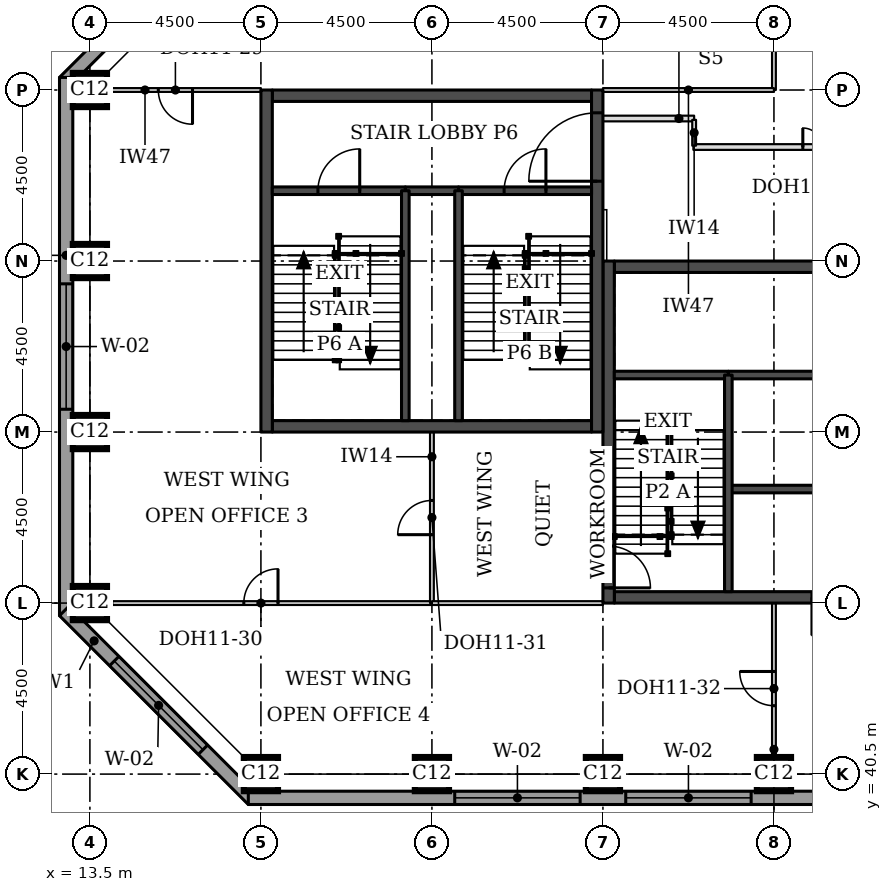
"""IFC4 building model, lengths in metres.
Left out: names, types, materials, properties, quantities, classifications, styles, units other than length and angle.
Written with IfcOpenShell. Run it as: python <this file> out.ifc"""

import sys

from ifc_helpers import new_model, si_unit, direction, frame, frame_2d, origin, origin_2d, place, context, subcontext, project, spatial, rectangle, extrude, element, fill, save


model = new_model("IFC4")
c1 = context("Model", 3, precision=1e-05, world=origin(), true_north=direction((0.0, 1.0)))
c2 = subcontext(c1, "Body", "Model", "MODEL_VIEW")
j1 = project(units=[si_unit("LENGTHUNIT", "METRE"), si_unit("PLANEANGLEUNIT", "RADIAN")], contexts=[c1])
p1 = place(None, origin())
s1 = spatial("IfcSite", under=j1, at=p1, CompositionType="ELEMENT")
p2 = place(p1, origin())
s2 = spatial("IfcBuilding", under=s1, at=p2, CompositionType="ELEMENT")
p3 = place(p2, frame((0.0, 0.0, 237.8)))
s3 = spatial("IfcBuildingStorey", under=s2, at=p3, CompositionType="ELEMENT", Elevation=237.8)
for number, where, z_axis, x_axis in (
    (1, (18.0, 40.5, 0.0), (0.0, 0.0, 1.0), (1.0, 0.0, 0.0)),
    (2, (22.5, 40.5, 0.0), (0.0, 0.0, 1.0), (1.0, 0.0, 0.0)),
    (3, (27.0, 40.5, 0.0), (0.0, 0.0, 1.0), (1.0, 0.0, 0.0)),
    (4, (31.5, 40.5, 0.0), (0.0, 0.0, 1.0), (1.0, 0.0, 0.0)),
    (5, (13.5, 45.0, 0.0), (0.0, 0.0, 1.0), (1.0, 0.0, 0.0)),
    (6, (13.5, 49.5, 0.0), (0.0, 0.0, 1.0), (1.0, 0.0, 0.0)),
    (7, (13.5, 54.0, 0.0), (0.0, 0.0, 1.0), (1.0, 0.0, 0.0)),
    (8, (13.5, 58.5, 0.0), (0.0, 0.0, 1.0), (1.0, 0.0, 0.0)),
):
    element("IfcColumn", number, at=place(p3, frame(where, z_axis=z_axis, x_axis=x_axis)), inside=s3, PredefinedType="COLUMN", context=c2, shape_type="SweptSolid", body=[
        extrude(rectangle(XDim=0.9, YDim=0.9, at=origin_2d()), origin(), (0.0, 0.0, 1.0), 3.7),
    ])
p4 = place(p3, frame((27.3, 45.15, 0.0), z_axis=(0.0, 0.0, 1.0), x_axis=(1.0, 0.0, 0.0)))
e9 = element("IfcWall", 9, at=p4, inside=s3, PredefinedType="SHEAR", context=c2, shape_type="SweptSolid", body=[
    extrude(rectangle(XDim=8.4, YDim=0.3, at=frame_2d((4.2, 0.0))), origin(), (0.0, 0.0, 1.0), 3.7),
])
p5 = place(p4, frame((5.2, 0.0, 0.0)))
e10 = element("IfcOpeningElement", 10, at=p5, cuts=e9, PredefinedType="OPENING", context=c2, shape_type="SweptSolid", body=[
    extrude(rectangle(XDim=1.0, YDim=2.1, at=frame_2d((0.5, 1.05))), frame((0.0, 0.16, 0.0), z_axis=(0.0, -1.0, 0.0), x_axis=(1.0, 0.0, 0.0)), (0.0, 0.0, 1.0), 0.32),
])
p6 = place(p3, frame((27.3, 53.85, 0.0), z_axis=(0.0, 0.0, 1.0), x_axis=(1.0, 0.0, 0.0)))
e11 = element("IfcWall", 11, at=p6, inside=s3, PredefinedType="SHEAR", context=c2, shape_type="SweptSolid", body=[
    extrude(rectangle(XDim=8.4, YDim=0.3, at=frame_2d((4.2, 0.0))), origin(), (0.0, 0.0, 1.0), 3.7),
])
p7 = place(p6, frame((6.4, 0.0, 0.0)))
e12 = element("IfcOpeningElement", 12, at=p7, cuts=e11, PredefinedType="OPENING", context=c2, shape_type="SweptSolid", body=[
    extrude(rectangle(XDim=1.1, YDim=2.1, at=frame_2d((0.55, 1.05))), frame((0.0, 0.16, 0.0), z_axis=(0.0, -1.0, 0.0), x_axis=(1.0, 0.0, 0.0)), (0.0, 0.0, 1.0), 0.32),
])
p8 = place(p3, frame((27.15, 45.0, 0.0), z_axis=(0.0, 0.0, 1.0), x_axis=(0.0, 1.0, 0.0)))
e13 = element("IfcWall", 13, at=p8, inside=s3, PredefinedType="SHEAR", context=c2, shape_type="SweptSolid", body=[
    extrude(rectangle(XDim=9.0, YDim=0.3, at=frame_2d((4.5, 0.0))), origin(), (0.0, 0.0, 1.0), 3.7),
])
p9 = place(p8, frame((0.4, 0.0, 0.0)))
e14 = element("IfcOpeningElement", 14, at=p9, cuts=e13, PredefinedType="OPENING", context=c2, shape_type="SweptSolid", body=[
    extrude(rectangle(XDim=1.1, YDim=2.1, at=frame_2d((0.55, 1.05))), frame((0.0, 0.16, 0.0), z_axis=(0.0, -1.0, 0.0), x_axis=(1.0, 0.0, 0.0)), (0.0, 0.0, 1.0), 0.32),
])
for number, where, z_axis, x_axis in (
    (15, (18.3, 49.65, 0.0), (0.0, 0.0, 1.0), (1.0, 0.0, 0.0)),
    (16, (18.3, 58.35, 0.0), (0.0, 0.0, 1.0), (1.0, 0.0, 0.0)),
):
    element("IfcWall", number, at=place(p3, frame(where, z_axis=z_axis, x_axis=x_axis)), inside=s3, PredefinedType="SHEAR", context=c2, shape_type="SweptSolid", body=[
        extrude(rectangle(XDim=8.4, YDim=0.3, at=frame_2d((4.2, 0.0))), origin(), (0.0, 0.0, 1.0), 3.7),
    ])
p10 = place(p3, frame((18.15, 49.5, 0.0), z_axis=(0.0, 0.0, 1.0), x_axis=(0.0, 1.0, 0.0)))
e17 = element("IfcWall", 17, at=p10, inside=s3, PredefinedType="SHEAR", context=c2, shape_type="SweptSolid", body=[
    extrude(rectangle(XDim=9.0, YDim=0.3, at=frame_2d((4.5, 0.0))), origin(), (0.0, 0.0, 1.0), 3.7),
])
p11 = place(p3, frame((26.85, 49.5, 0.0), z_axis=(0.0, 0.0, 1.0), x_axis=(0.0, 1.0, 0.0)))
e18 = element("IfcWall", 18, at=p11, inside=s3, PredefinedType="SHEAR", context=c2, shape_type="SweptSolid", body=[
    extrude(rectangle(XDim=9.0, YDim=0.3, at=frame_2d((4.5, 0.0))), origin(), (0.0, 0.0, 1.0), 3.7),
])
p12 = place(p11, frame((6.6, 0.0, 0.0)))
e19 = element("IfcOpeningElement", 19, at=p12, cuts=e18, PredefinedType="OPENING", context=c2, shape_type="SweptSolid", body=[
    extrude(rectangle(XDim=1.8, YDim=2.1, at=frame_2d((0.9, 1.05))), frame((0.0, 0.16, 0.0), z_axis=(0.0, -1.0, 0.0), x_axis=(1.0, 0.0, 0.0)), (0.0, 0.0, 1.0), 0.32),
])
p13 = place(p3, frame((17.792, 63.676, 0.0), z_axis=(0.0, 0.0, 1.0), x_axis=(-0.707106781187, -0.707106781187, 0.0)))
e20 = element("IfcWall", 20, at=p13, inside=s3, PredefinedType="STANDARD", context=c2, shape_type="SweptSolid", body=[
    extrude(rectangle(XDim=7.027, YDim=0.35, at=frame_2d((3.513, 0.0))), origin(), (0.0, 0.0, 1.0), 3.525),
])
p14 = place(p13, frame((1.863, 0.0, 0.9)))
e21 = element("IfcOpeningElement", 21, at=p14, cuts=e20, PredefinedType="OPENING", context=c2, shape_type="SweptSolid", body=[
    extrude(rectangle(XDim=3.3, YDim=1.9, at=frame_2d((1.65, 0.95))), frame((0.0, 0.185, 0.0), z_axis=(0.0, -1.0, 0.0), x_axis=(1.0, 0.0, 0.0)), (0.0, 0.0, 1.0), 0.37),
])
p15 = place(p3, frame((12.875, 58.831, 0.0), z_axis=(0.0, 0.0, 1.0), x_axis=(0.0, -1.0, 0.0)))
e22 = element("IfcWall", 22, at=p15, inside=s3, PredefinedType="STANDARD", context=c2, shape_type="SweptSolid", body=[
    extrude(rectangle(XDim=14.163, YDim=0.35, at=frame_2d((7.081, 0.0))), origin(), (0.0, 0.0, 1.0), 3.525),
])
p16 = place(p15, frame((5.431, 0.0, 0.9)))
e23 = element("IfcOpeningElement", 23, at=p16, cuts=e22, PredefinedType="OPENING", context=c2, shape_type="SweptSolid", body=[
    extrude(rectangle(XDim=3.3, YDim=1.9, at=frame_2d((1.65, 0.95))), frame((0.0, 0.185, 0.0), z_axis=(0.0, -1.0, 0.0), x_axis=(1.0, 0.0, 0.0)), (0.0, 0.0, 1.0), 0.37),
])
p17 = place(p3, frame((12.824, 44.792, 0.0), z_axis=(0.0, 0.0, 1.0), x_axis=(0.707106781187, -0.707106781187, 0.0)))
e24 = element("IfcWall", 24, at=p17, inside=s3, PredefinedType="STANDARD", context=c2, shape_type="SweptSolid", body=[
    extrude(rectangle(XDim=7.027, YDim=0.35, at=frame_2d((3.513, 0.0))), origin(), (0.0, 0.0, 1.0), 3.525),
])
p18 = place(p17, frame((1.863, 0.0, 0.9)))
e25 = element("IfcOpeningElement", 25, at=p18, cuts=e24, PredefinedType="OPENING", context=c2, shape_type="SweptSolid", body=[
    extrude(rectangle(XDim=3.3, YDim=1.9, at=frame_2d((1.65, 0.95))), frame((0.0, 0.185, 0.0), z_axis=(0.0, -1.0, 0.0), x_axis=(1.0, 0.0, 0.0)), (0.0, 0.0, 1.0), 0.37),
])
p19 = place(p3, frame((17.669, 39.875, 0.0), z_axis=(0.0, 0.0, 1.0), x_axis=(1.0, 0.0, 0.0)))
e26 = element("IfcWall", 26, at=p19, inside=s3, PredefinedType="STANDARD", context=c2, shape_type="SweptSolid", body=[
    extrude(rectangle(XDim=18.331, YDim=0.35, at=frame_2d((9.166, 0.0))), origin(), (0.0, 0.0, 1.0), 3.525),
])
p20 = place(p19, frame((5.431, 0.0, 0.9)))
e27 = element("IfcOpeningElement", 27, at=p20, cuts=e26, PredefinedType="OPENING", context=c2, shape_type="SweptSolid", body=[
    extrude(rectangle(XDim=3.3, YDim=1.9, at=frame_2d((1.65, 0.95))), frame((0.0, 0.185, 0.0), z_axis=(0.0, -1.0, 0.0), x_axis=(1.0, 0.0, 0.0)), (0.0, 0.0, 1.0), 0.37),
])
p21 = place(p19, frame((9.931, 0.0, 0.9)))
e28 = element("IfcOpeningElement", 28, at=p21, cuts=e26, PredefinedType="OPENING", context=c2, shape_type="SweptSolid", body=[
    extrude(rectangle(XDim=3.3, YDim=1.9, at=frame_2d((1.65, 0.95))), frame((0.0, 0.185, 0.0), z_axis=(0.0, -1.0, 0.0), x_axis=(1.0, 0.0, 0.0)), (0.0, 0.0, 1.0), 0.37),
])
p22 = place(p3, frame((29.38, 57.0, 0.0), z_axis=(0.0, 0.0, 1.0), x_axis=(1.0, 0.0, 0.0)))
e29 = element("IfcWall", 29, at=p22, inside=s3, PredefinedType="PARTITIONING", context=c2, shape_type="SweptSolid", body=[
    extrude(rectangle(XDim=6.62, YDim=0.15, at=frame_2d((3.31, 0.0))), origin(), (0.0, 0.0, 1.0), 3.55),
])
p23 = place(p22, frame((2.88, 0.0, 0.0)))
e30 = element("IfcOpeningElement", 30, at=p23, cuts=e29, PredefinedType="OPENING", context=c2, shape_type="SweptSolid", body=[
    extrude(rectangle(XDim=1.0, YDim=2.1, at=frame_2d((0.5, 1.05))), frame((0.0, 0.085, 0.0), z_axis=(0.0, -1.0, 0.0), x_axis=(1.0, 0.0, 0.0)), (0.0, 0.0, 1.0), 0.17),
])
p24 = place(p3, frame((31.5, 63.0, 0.0), z_axis=(0.0, 0.0, 1.0), x_axis=(0.0, -1.0, 0.0)))
e31 = element("IfcWall", 31, at=p24, inside=s3, PredefinedType="PARTITIONING", context=c2, shape_type="SweptSolid", body=[
    extrude(rectangle(XDim=4.5, YDim=0.1, at=frame_2d((2.25, 0.0))), origin(), (0.0, 0.0, 1.0), 3.55),
])
p25 = place(p24, frame((1.8, 0.0, 0.0)))
e32 = element("IfcOpeningElement", 32, at=p25, cuts=e31, PredefinedType="OPENING", context=c2, shape_type="SweptSolid", body=[
    extrude(rectangle(XDim=0.9, YDim=2.1, at=frame_2d((0.45, 1.05))), frame((0.0, 0.06, 0.0), z_axis=(0.0, -1.0, 0.0), x_axis=(1.0, 0.0, 0.0)), (0.0, 0.0, 1.0), 0.12),
])
p26 = place(p3, frame((31.5, 58.5, 0.0), z_axis=(0.0, 0.0, 1.0), x_axis=(-1.0, 0.0, 0.0)))
e33 = element("IfcWall", 33, at=p26, inside=s3, PredefinedType="PARTITIONING", context=c2, shape_type="SweptSolid", body=[
    extrude(rectangle(XDim=4.5, YDim=0.1, at=frame_2d((2.25, 0.0))), origin(), (0.0, 0.0, 1.0), 2.55),
])
p27 = place(p3, frame((13.5, 58.5, 0.0), z_axis=(0.0, 0.0, 1.0), x_axis=(1.0, 0.0, 0.0)))
e34 = element("IfcWall", 34, at=p27, inside=s3, PredefinedType="PARTITIONING", context=c2, shape_type="SweptSolid", body=[
    extrude(rectangle(XDim=4.5, YDim=0.1, at=frame_2d((2.25, 0.0))), origin(), (0.0, 0.0, 1.0), 2.55),
])
p28 = place(p27, frame((1.8, 0.0, 0.0)))
e35 = element("IfcOpeningElement", 35, at=p28, cuts=e34, PredefinedType="OPENING", context=c2, shape_type="SweptSolid", body=[
    extrude(rectangle(XDim=0.9, YDim=2.1, at=frame_2d((0.45, 1.05))), frame((0.0, 0.06, 0.0), z_axis=(0.0, -1.0, 0.0), x_axis=(1.0, 0.0, 0.0)), (0.0, 0.0, 1.0), 0.12),
])
p29 = place(p3, frame((22.5, 45.0, 0.0), z_axis=(0.0, 0.0, 1.0), x_axis=(-1.0, 0.0, 0.0)))
e36 = element("IfcWall", 36, at=p29, inside=s3, PredefinedType="PARTITIONING", context=c2, shape_type="SweptSolid", body=[
    extrude(rectangle(XDim=9.0, YDim=0.1, at=frame_2d((4.5, 0.0))), origin(), (0.0, 0.0, 1.0), 2.55),
])
p30 = place(p29, frame((4.05, 0.0, 0.0)))
e37 = element("IfcOpeningElement", 37, at=p30, cuts=e36, PredefinedType="OPENING", context=c2, shape_type="SweptSolid", body=[
    extrude(rectangle(XDim=0.9, YDim=2.1, at=frame_2d((0.45, 1.05))), frame((0.0, 0.06, 0.0), z_axis=(0.0, -1.0, 0.0), x_axis=(1.0, 0.0, 0.0)), (0.0, 0.0, 1.0), 0.12),
])
p31 = place(p3, frame((22.5, 49.5, 0.0), z_axis=(0.0, 0.0, 1.0), x_axis=(0.0, -1.0, 0.0)))
e38 = element("IfcWall", 38, at=p31, inside=s3, PredefinedType="PARTITIONING", context=c2, shape_type="SweptSolid", body=[
    extrude(rectangle(XDim=4.5, YDim=0.1, at=frame_2d((2.25, 0.0))), origin(), (0.0, 0.0, 1.0), 3.55),
])
p32 = place(p31, frame((1.8, 0.0, 0.0)))
e39 = element("IfcOpeningElement", 39, at=p32, cuts=e38, PredefinedType="OPENING", context=c2, shape_type="SweptSolid", body=[
    extrude(rectangle(XDim=0.9, YDim=2.1, at=frame_2d((0.45, 1.05))), frame((0.0, 0.06, 0.0), z_axis=(0.0, -1.0, 0.0), x_axis=(1.0, 0.0, 0.0)), (0.0, 0.0, 1.0), 0.12),
])
p33 = place(p3, frame((22.5, 45.0, 0.0), z_axis=(0.0, 0.0, 1.0), x_axis=(1.0, 0.0, 0.0)))
e40 = element("IfcWall", 40, at=p33, inside=s3, PredefinedType="PARTITIONING", context=c2, shape_type="SweptSolid", body=[
    extrude(rectangle(XDim=4.5, YDim=0.1, at=frame_2d((2.25, 0.0))), origin(), (0.0, 0.0, 1.0), 2.55),
])
p34 = place(p3, frame((31.5, 45.0, 0.0), z_axis=(0.0, 0.0, 1.0), x_axis=(0.0, -1.0, 0.0)))
e41 = element("IfcWall", 41, at=p34, inside=s3, PredefinedType="PARTITIONING", context=c2, shape_type="SweptSolid", body=[
    extrude(rectangle(XDim=4.5, YDim=0.1, at=frame_2d((2.25, 0.0))), origin(), (0.0, 0.0, 1.0), 3.55),
])
p35 = place(p34, frame((1.8, 0.0, 0.0)))
e42 = element("IfcOpeningElement", 42, at=p35, cuts=e41, PredefinedType="OPENING", context=c2, shape_type="SweptSolid", body=[
    extrude(rectangle(XDim=0.9, YDim=2.1, at=frame_2d((0.45, 1.05))), frame((0.0, 0.06, 0.0), z_axis=(0.0, -1.0, 0.0), x_axis=(1.0, 0.0, 0.0)), (0.0, 0.0, 1.0), 0.12),
])
p36 = place(p3, frame((27.0, 57.75, 0.0), z_axis=(0.0, 0.0, 1.0), x_axis=(1.0, 0.0, 0.0)))
e43 = element("IfcWall", 43, at=p36, inside=s3, PredefinedType="PARTITIONING", context=c2, shape_type="SweptSolid", body=[
    extrude(rectangle(XDim=2.4, YDim=0.15, at=frame_2d((1.2, 0.0))), origin(), (0.0, 0.0, 1.0), 3.55),
])
p37 = place(p3, frame((29.4, 57.715, 0.0), z_axis=(0.0, 0.0, 1.0), x_axis=(0.0, -1.0, 0.0)))
e44 = element("IfcWall", 44, at=p37, inside=s3, PredefinedType="PARTITIONING", context=c2, shape_type="SweptSolid", body=[
    extrude(rectangle(XDim=0.68, YDim=0.1, at=frame_2d((0.34, 0.0))), origin(), (0.0, 0.0, 1.0), 3.55),
])
p38 = place(p3, frame((30.3, 48.0, 0.0), z_axis=(0.0, 0.0, 1.0), x_axis=(1.0, 0.0, 0.0)))
e45 = element("IfcWall", 45, at=p38, inside=s3, PredefinedType="SOLIDWALL", context=c2, shape_type="SweptSolid", body=[
    extrude(rectangle(XDim=2.4, YDim=0.2, at=frame_2d((1.2, 0.0))), origin(), (0.0, 0.0, 1.0), 3.55),
])
p39 = place(p3, frame((30.3, 51.0, 0.0), z_axis=(0.0, 0.0, 1.0), x_axis=(1.0, 0.0, 0.0)))
e46 = element("IfcWall", 46, at=p39, inside=s3, PredefinedType="SOLIDWALL", context=c2, shape_type="SweptSolid", body=[
    extrude(rectangle(XDim=2.4, YDim=0.2, at=frame_2d((1.2, 0.0))), origin(), (0.0, 0.0, 1.0), 3.7),
])
p40 = place(p3, frame((27.3, 51.0, 0.0), z_axis=(0.0, 0.0, 1.0), x_axis=(1.0, 0.0, 0.0)))
e47 = element("IfcWall", 47, at=p40, inside=s3, PredefinedType="SOLIDWALL", context=c2, shape_type="SweptSolid", body=[
    extrude(rectangle(XDim=3.0, YDim=0.2, at=frame_2d((1.5, 0.0))), origin(), (0.0, 0.0, 1.0), 3.55),
])
p41 = place(p3, frame((30.3, 45.3, 0.0), z_axis=(0.0, 0.0, 1.0), x_axis=(0.0, 1.0, 0.0)))
e48 = element("IfcWall", 48, at=p41, inside=s3, PredefinedType="SOLIDWALL", context=c2, shape_type="SweptSolid", body=[
    extrude(rectangle(XDim=5.7, YDim=0.2, at=frame_2d((2.85, 0.0))), origin(), (0.0, 0.0, 1.0), 3.55),
])
p42 = place(p3, frame((21.8, 55.85, 0.0), z_axis=(0.0, 0.0, 1.0), x_axis=(1.0, 0.0, 0.0)))
e49 = element("IfcWall", 49, at=p42, inside=s3, PredefinedType="SOLIDWALL", context=c2, shape_type="SweptSolid", body=[
    extrude(rectangle(XDim=1.4, YDim=0.2, at=frame_2d((0.7, 0.0))), origin(), (0.0, 0.0, 1.0), 3.55),
])
p43 = place(p3, frame((18.3, 55.85, 0.0), z_axis=(0.0, 0.0, 1.0), x_axis=(1.0, 0.0, 0.0)))
e50 = element("IfcWall", 50, at=p43, inside=s3, PredefinedType="SOLIDWALL", context=c2, shape_type="SweptSolid", body=[
    extrude(rectangle(XDim=3.5, YDim=0.2, at=frame_2d((1.75, 0.0))), origin(), (0.0, 0.0, 1.0), 3.55),
])
p44 = place(p43, frame((1.2, 0.0, 0.0)))
e51 = element("IfcOpeningElement", 51, at=p44, cuts=e50, PredefinedType="OPENING", context=c2, shape_type="SweptSolid", body=[
    extrude(rectangle(XDim=1.1, YDim=2.1, at=frame_2d((0.55, 1.05))), frame((0.0, 0.11, 0.0), z_axis=(0.0, -1.0, 0.0), x_axis=(1.0, 0.0, 0.0)), (0.0, 0.0, 1.0), 0.22),
])
p45 = place(p3, frame((23.2, 55.85, 0.0), z_axis=(0.0, 0.0, 1.0), x_axis=(1.0, 0.0, 0.0)))
e52 = element("IfcWall", 52, at=p45, inside=s3, PredefinedType="SOLIDWALL", context=c2, shape_type="SweptSolid", body=[
    extrude(rectangle(XDim=3.5, YDim=0.2, at=frame_2d((1.75, 0.0))), origin(), (0.0, 0.0, 1.0), 3.55),
])
p46 = place(p45, frame((1.2, 0.0, 0.0)))
e53 = element("IfcOpeningElement", 53, at=p46, cuts=e52, PredefinedType="OPENING", context=c2, shape_type="SweptSolid", body=[
    extrude(rectangle(XDim=1.1, YDim=2.1, at=frame_2d((0.55, 1.05))), frame((0.0, 0.11, 0.0), z_axis=(0.0, -1.0, 0.0), x_axis=(1.0, 0.0, 0.0)), (0.0, 0.0, 1.0), 0.22),
])
for number, where, z_axis, x_axis in (
    (54, (21.8, 49.8, 0.0), (0.0, 0.0, 1.0), (0.0, 1.0, 0.0)),
    (55, (23.2, 49.8, 0.0), (0.0, 0.0, 1.0), (0.0, 1.0, 0.0)),
):
    element("IfcWall", number, at=place(p3, frame(where, z_axis=z_axis, x_axis=x_axis)), inside=s3, PredefinedType="SOLIDWALL", context=c2, shape_type="SweptSolid", body=[
        extrude(rectangle(XDim=6.05, YDim=0.2, at=frame_2d((3.025, 0.0))), origin(), (0.0, 0.0, 1.0), 3.55),
    ])
p47 = place(p16, origin())
e56 = element("IfcWindow", 56, at=p47, inside=s3, PartitioningType="SINGLE_PANEL", PredefinedType="WINDOW", context=c2, shape_type="SweptSolid", body=[
    extrude(rectangle(XDim=3.3, YDim=1.9, at=frame_2d((1.65, 0.95))), frame((0.0, 0.085, 0.0), z_axis=(0.0, -1.0, 0.0), x_axis=(1.0, 0.0, 0.0)), (0.0, 0.0, 1.0), 0.06),
])
fill(e23, e56)
p48 = place(p18, origin())
e57 = element("IfcWindow", 57, at=p48, inside=s3, PartitioningType="SINGLE_PANEL", PredefinedType="WINDOW", context=c2, shape_type="SweptSolid", body=[
    extrude(rectangle(XDim=3.3, YDim=1.9, at=frame_2d((1.65, 0.95))), frame((0.0, 0.085, 0.0), z_axis=(0.0, -1.0, 0.0), x_axis=(1.0, 0.0, 0.0)), (0.0, 0.0, 1.0), 0.06),
])
fill(e25, e57)
p49 = place(p20, origin())
e58 = element("IfcWindow", 58, at=p49, inside=s3, PartitioningType="SINGLE_PANEL", PredefinedType="WINDOW", context=c2, shape_type="SweptSolid", body=[
    extrude(rectangle(XDim=3.3, YDim=1.9, at=frame_2d((1.65, 0.95))), frame((0.0, 0.085, 0.0), z_axis=(0.0, -1.0, 0.0), x_axis=(1.0, 0.0, 0.0)), (0.0, 0.0, 1.0), 0.06),
])
fill(e27, e58)
p50 = place(p21, origin())
e59 = element("IfcWindow", 59, at=p50, inside=s3, PartitioningType="SINGLE_PANEL", PredefinedType="WINDOW", context=c2, shape_type="SweptSolid", body=[
    extrude(rectangle(XDim=3.3, YDim=1.9, at=frame_2d((1.65, 0.95))), frame((0.0, 0.085, 0.0), z_axis=(0.0, -1.0, 0.0), x_axis=(1.0, 0.0, 0.0)), (0.0, 0.0, 1.0), 0.06),
])
fill(e28, e59)
p51 = place(p23, origin())
e60 = element("IfcDoor", 60, at=p51, inside=s3, OperationType="DOUBLE_DOOR_SINGLE_SWING", PredefinedType="DOOR", context=c2, shape_type="SweptSolid", body=[
    extrude(rectangle(XDim=1.0, YDim=2.1, at=frame_2d((0.5, 1.05))), frame((0.0, 0.025, 0.0), z_axis=(0.0, -1.0, 0.0), x_axis=(1.0, 0.0, 0.0)), (0.0, 0.0, 1.0), 0.05),
])
fill(e30, e60)
p52 = place(p28, frame((0.9, 0.0, 0.0), z_axis=(0.0, 0.0, 1.0), x_axis=(-1.0, 0.0, 0.0)))
e61 = element("IfcDoor", 61, at=p52, inside=s3, OperationType="SINGLE_SWING_LEFT", PredefinedType="DOOR", context=c2, shape_type="SweptSolid", body=[
    extrude(rectangle(XDim=0.9, YDim=2.1, at=frame_2d((0.45, 1.05))), frame((0.0, 0.025, 0.0), z_axis=(0.0, -1.0, 0.0), x_axis=(1.0, 0.0, 0.0)), (0.0, 0.0, 1.0), 0.05),
])
fill(e35, e61)
p53 = place(p30, frame((0.9, 0.0, 0.0), z_axis=(0.0, 0.0, 1.0), x_axis=(-1.0, 0.0, 0.0)))
e62 = element("IfcDoor", 62, at=p53, inside=s3, OperationType="SINGLE_SWING_RIGHT", PredefinedType="DOOR", context=c2, shape_type="SweptSolid", body=[
    extrude(rectangle(XDim=0.9, YDim=2.1, at=frame_2d((0.45, 1.05))), frame((0.0, 0.025, 0.0), z_axis=(0.0, -1.0, 0.0), x_axis=(1.0, 0.0, 0.0)), (0.0, 0.0, 1.0), 0.05),
])
fill(e37, e62)
p54 = place(p32, frame((0.9, 0.0, 0.0), z_axis=(0.0, 0.0, 1.0), x_axis=(-1.0, 0.0, 0.0)))
e63 = element("IfcDoor", 63, at=p54, inside=s3, OperationType="SINGLE_SWING_LEFT", PredefinedType="DOOR", context=c2, shape_type="SweptSolid", body=[
    extrude(rectangle(XDim=0.9, YDim=2.1, at=frame_2d((0.45, 1.05))), frame((0.0, 0.025, 0.0), z_axis=(0.0, -1.0, 0.0), x_axis=(1.0, 0.0, 0.0)), (0.0, 0.0, 1.0), 0.05),
])
fill(e39, e63)
p55 = place(p35, frame((0.9, 0.0, 0.0), z_axis=(0.0, 0.0, 1.0), x_axis=(-1.0, 0.0, 0.0)))
e64 = element("IfcDoor", 64, at=p55, inside=s3, OperationType="SINGLE_SWING_RIGHT", PredefinedType="DOOR", context=c2, shape_type="SweptSolid", body=[
    extrude(rectangle(XDim=0.9, YDim=2.1, at=frame_2d((0.45, 1.05))), frame((0.0, 0.025, 0.0), z_axis=(0.0, -1.0, 0.0), x_axis=(1.0, 0.0, 0.0)), (0.0, 0.0, 1.0), 0.05),
])
fill(e42, e64)
p56 = place(p9, frame((1.1, 0.0, 0.0), z_axis=(0.0, 0.0, 1.0), x_axis=(-1.0, 0.0, 0.0)))
e65 = element("IfcDoor", 65, at=p56, inside=s3, OperationType="SINGLE_SWING_RIGHT", PredefinedType="DOOR", context=c2, shape_type="SweptSolid", body=[
    extrude(rectangle(XDim=1.1, YDim=2.1, at=frame_2d((0.55, 1.05))), frame((0.0, 0.025, 0.0), z_axis=(0.0, -1.0, 0.0), x_axis=(1.0, 0.0, 0.0)), (0.0, 0.0, 1.0), 0.05),
])
fill(e14, e65)
p57 = place(p44, origin())
e66 = element("IfcDoor", 66, at=p57, inside=s3, OperationType="SINGLE_SWING_RIGHT", PredefinedType="DOOR", context=c2, shape_type="SweptSolid", body=[
    extrude(rectangle(XDim=1.1, YDim=2.1, at=frame_2d((0.55, 1.05))), frame((0.0, 0.025, 0.0), z_axis=(0.0, -1.0, 0.0), x_axis=(1.0, 0.0, 0.0)), (0.0, 0.0, 1.0), 0.05),
])
fill(e51, e66)
p58 = place(p46, origin())
e67 = element("IfcDoor", 67, at=p58, inside=s3, OperationType="SINGLE_SWING_RIGHT", PredefinedType="DOOR", context=c2, shape_type="SweptSolid", body=[
    extrude(rectangle(XDim=1.1, YDim=2.1, at=frame_2d((0.55, 1.05))), frame((0.0, 0.025, 0.0), z_axis=(0.0, -1.0, 0.0), x_axis=(1.0, 0.0, 0.0)), (0.0, 0.0, 1.0), 0.05),
])
fill(e53, e67)
p59 = place(p12, origin())
e68 = element("IfcDoor", 68, at=p59, inside=s3, OperationType="SINGLE_SWING_LEFT", PredefinedType="DOOR", context=c2, shape_type="SweptSolid", body=[
    extrude(rectangle(XDim=1.8, YDim=2.1, at=frame_2d((0.9, 1.05))), frame((0.0, 0.025, 0.0), z_axis=(0.0, -1.0, 0.0), x_axis=(1.0, 0.0, 0.0)), (0.0, 0.0, 1.0), 0.05),
])
fill(e19, e68)
save(model, sys.argv[1])
